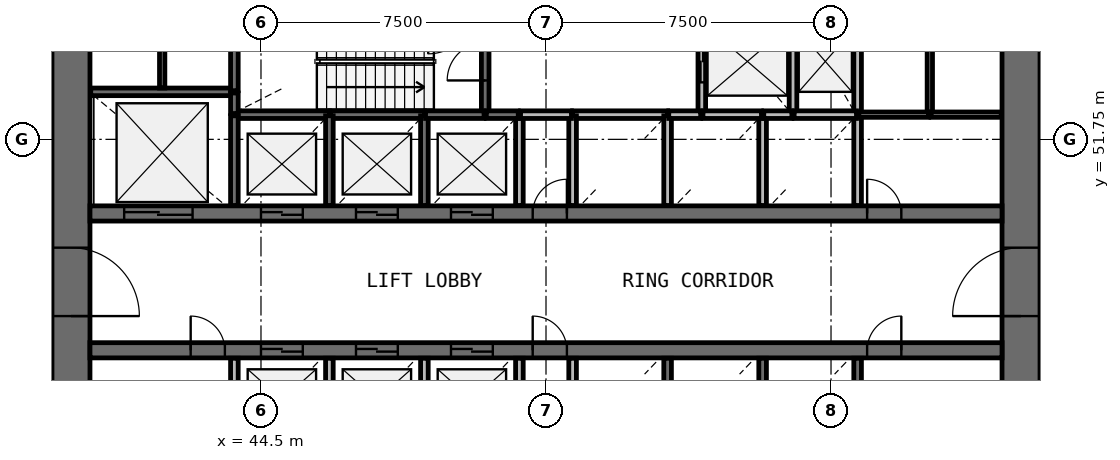
"""IFC4 building model, lengths in metres.
Left out: names, types, materials, properties, quantities, classifications, styles, units other than length and angle.
Written with IfcOpenShell. Run it as: python <this file> out.ifc"""

import sys

from ifc_helpers import new_model, si_unit, direction, frame, frame_2d, origin, place, context, subcontext, project, spatial, rectangle, extrude, source, transform, mapped, element, fill, save


model = new_model("IFC4")
c1 = context("Model", 3, precision=1e-05, world=origin(), true_north=direction((0.0, 1.0)))
c2 = subcontext(c1, "Body", "Model", "MODEL_VIEW")
j1 = project(units=[si_unit("LENGTHUNIT", "METRE"), si_unit("PLANEANGLEUNIT", "RADIAN")], contexts=[c1])
p1 = place(None, origin())
s1 = spatial("IfcSite", under=j1, at=p1, CompositionType="ELEMENT")
p2 = place(p1, origin())
s2 = spatial("IfcBuilding", under=s1, at=p2, CompositionType="ELEMENT")
p3 = place(p2, frame((0.0, 0.0, 53.4)))
s3 = spatial("IfcBuildingStorey", under=s2, at=p3, CompositionType="ELEMENT", Elevation=53.4)
p4 = place(p3, frame((64.5, 38.0, 0.0), z_axis=(0.0, 0.0, 1.0), x_axis=(0.0, 1.0, 0.0)))
e1 = element("IfcWall", 1, at=p4, inside=s3, PredefinedType="SHEAR", context=c2, shape_type="SweptSolid", body=[
    extrude(rectangle(XDim=20.0, YDim=1.0, at=frame_2d((10.0, 0.0))), origin(), (0.0, 0.0, 1.0), 4.4),
])
p5 = place(p4, frame((9.1, 0.0, 0.0)))
e2 = element("IfcOpeningElement", 2, at=p5, cuts=e1, PredefinedType="OPENING", context=c2, shape_type="SweptSolid", body=[
    extrude(rectangle(XDim=1.8, YDim=2.1, at=frame_2d((0.9, 1.05))), frame((0.0, 0.51, 0.0), z_axis=(0.0, -1.0, 0.0), x_axis=(1.0, 0.0, 0.0)), (0.0, 0.0, 1.0), 1.02),
])
p6 = place(p3, frame((39.5, 58.0, 0.0), z_axis=(0.0, 0.0, 1.0), x_axis=(0.0, -1.0, 0.0)))
e3 = element("IfcWall", 3, at=p6, inside=s3, PredefinedType="SHEAR", context=c2, shape_type="SweptSolid", body=[
    extrude(rectangle(XDim=20.0, YDim=1.0, at=frame_2d((10.0, 0.0))), origin(), (0.0, 0.0, 1.0), 4.4),
])
p7 = place(p6, frame((9.1, 0.0, 0.0)))
e4 = element("IfcOpeningElement", 4, at=p7, cuts=e3, PredefinedType="OPENING", context=c2, shape_type="SweptSolid", body=[
    extrude(rectangle(XDim=1.8, YDim=2.1, at=frame_2d((0.9, 1.05))), frame((0.0, 0.51, 0.0), z_axis=(0.0, -1.0, 0.0), x_axis=(1.0, 0.0, 0.0)), (0.0, 0.0, 1.0), 1.02),
])
p8 = place(p3, frame((40.0, 49.8, 0.0), z_axis=(0.0, 0.0, 1.0), x_axis=(1.0, 0.0, 0.0)))
e5 = element("IfcWall", 5, at=p8, inside=s3, PredefinedType="SHEAR", context=c2, shape_type="SweptSolid", body=[
    extrude(rectangle(XDim=24.0, YDim=0.4, at=frame_2d((12.0, 0.0))), origin(), (0.0, 0.0, 1.0), 4.4),
])
p9 = place(p8, frame((4.5, 0.0, 0.0)))
e6 = element("IfcOpeningElement", 6, at=p9, cuts=e5, PredefinedType="OPENING", context=c2, shape_type="SweptSolid", body=[
    extrude(rectangle(XDim=1.1, YDim=2.1, at=frame_2d((0.55, 1.05))), frame((0.0, 0.21, 0.0), z_axis=(0.0, -1.0, 0.0), x_axis=(1.0, 0.0, 0.0)), (0.0, 0.0, 1.0), 0.42),
])
p10 = place(p8, frame((7.0, 0.0, 0.0)))
e7 = element("IfcOpeningElement", 7, at=p10, cuts=e5, PredefinedType="OPENING", context=c2, shape_type="SweptSolid", body=[
    extrude(rectangle(XDim=1.1, YDim=2.1, at=frame_2d((0.55, 1.05))), frame((0.0, 0.21, 0.0), z_axis=(0.0, -1.0, 0.0), x_axis=(1.0, 0.0, 0.0)), (0.0, 0.0, 1.0), 0.42),
])
p11 = place(p8, frame((9.5, 0.0, 0.0)))
e8 = element("IfcOpeningElement", 8, at=p11, cuts=e5, PredefinedType="OPENING", context=c2, shape_type="SweptSolid", body=[
    extrude(rectangle(XDim=1.1, YDim=2.1, at=frame_2d((0.55, 1.05))), frame((0.0, 0.21, 0.0), z_axis=(0.0, -1.0, 0.0), x_axis=(1.0, 0.0, 0.0)), (0.0, 0.0, 1.0), 0.42),
])
p12 = place(p8, frame((0.9, 0.0, 0.0)))
e9 = element("IfcOpeningElement", 9, at=p12, cuts=e5, PredefinedType="OPENING", context=c2, shape_type="SweptSolid", body=[
    extrude(rectangle(XDim=1.8, YDim=2.4, at=frame_2d((0.9, 1.2))), frame((0.0, 0.21, 0.0), z_axis=(0.0, -1.0, 0.0), x_axis=(1.0, 0.0, 0.0)), (0.0, 0.0, 1.0), 0.42),
])
p13 = place(p8, frame((20.45, 0.0, 0.0)))
e10 = element("IfcOpeningElement", 10, at=p13, cuts=e5, PredefinedType="OPENING", context=c2, shape_type="SweptSolid", body=[
    extrude(rectangle(XDim=0.9, YDim=2.1, at=frame_2d((0.45, 1.05))), frame((0.0, 0.21, 0.0), z_axis=(0.0, -1.0, 0.0), x_axis=(1.0, 0.0, 0.0)), (0.0, 0.0, 1.0), 0.42),
])
p14 = place(p8, frame((11.65, 0.0, 0.0)))
e11 = element("IfcOpeningElement", 11, at=p14, cuts=e5, PredefinedType="OPENING", context=c2, shape_type="SweptSolid", body=[
    extrude(rectangle(XDim=0.9, YDim=2.1, at=frame_2d((0.45, 1.05))), frame((0.0, 0.21, 0.0), z_axis=(0.0, -1.0, 0.0), x_axis=(1.0, 0.0, 0.0)), (0.0, 0.0, 1.0), 0.42),
])
p15 = place(p3, frame((40.0, 46.2, 0.0), z_axis=(0.0, 0.0, 1.0), x_axis=(1.0, 0.0, 0.0)))
e12 = element("IfcWall", 12, at=p15, inside=s3, PredefinedType="SHEAR", context=c2, shape_type="SweptSolid", body=[
    extrude(rectangle(XDim=24.0, YDim=0.4, at=frame_2d((12.0, 0.0))), origin(), (0.0, 0.0, 1.0), 4.4),
])
p16 = place(p15, frame((4.5, 0.0, 0.0)))
e13 = element("IfcOpeningElement", 13, at=p16, cuts=e12, PredefinedType="OPENING", context=c2, shape_type="SweptSolid", body=[
    extrude(rectangle(XDim=1.1, YDim=2.1, at=frame_2d((0.55, 1.05))), frame((0.0, 0.21, 0.0), z_axis=(0.0, -1.0, 0.0), x_axis=(1.0, 0.0, 0.0)), (0.0, 0.0, 1.0), 0.42),
])
p17 = place(p15, frame((7.0, 0.0, 0.0)))
e14 = element("IfcOpeningElement", 14, at=p17, cuts=e12, PredefinedType="OPENING", context=c2, shape_type="SweptSolid", body=[
    extrude(rectangle(XDim=1.1, YDim=2.1, at=frame_2d((0.55, 1.05))), frame((0.0, 0.21, 0.0), z_axis=(0.0, -1.0, 0.0), x_axis=(1.0, 0.0, 0.0)), (0.0, 0.0, 1.0), 0.42),
])
p18 = place(p15, frame((9.5, 0.0, 0.0)))
e15 = element("IfcOpeningElement", 15, at=p18, cuts=e12, PredefinedType="OPENING", context=c2, shape_type="SweptSolid", body=[
    extrude(rectangle(XDim=1.1, YDim=2.1, at=frame_2d((0.55, 1.05))), frame((0.0, 0.21, 0.0), z_axis=(0.0, -1.0, 0.0), x_axis=(1.0, 0.0, 0.0)), (0.0, 0.0, 1.0), 0.42),
])
p19 = place(p15, frame((20.45, 0.0, 0.0)))
e16 = element("IfcOpeningElement", 16, at=p19, cuts=e12, PredefinedType="OPENING", context=c2, shape_type="SweptSolid", body=[
    extrude(rectangle(XDim=0.9, YDim=2.1, at=frame_2d((0.45, 1.05))), frame((0.0, 0.21, 0.0), z_axis=(0.0, -1.0, 0.0), x_axis=(1.0, 0.0, 0.0)), (0.0, 0.0, 1.0), 0.42),
])
p20 = place(p15, frame((2.65, 0.0, 0.0)))
e17 = element("IfcOpeningElement", 17, at=p20, cuts=e12, PredefinedType="OPENING", context=c2, shape_type="SweptSolid", body=[
    extrude(rectangle(XDim=0.9, YDim=2.1, at=frame_2d((0.45, 1.05))), frame((0.0, 0.21, 0.0), z_axis=(0.0, -1.0, 0.0), x_axis=(1.0, 0.0, 0.0)), (0.0, 0.0, 1.0), 0.42),
])
p21 = place(p15, frame((11.65, 0.0, 0.0)))
e18 = element("IfcOpeningElement", 18, at=p21, cuts=e12, PredefinedType="OPENING", context=c2, shape_type="SweptSolid", body=[
    extrude(rectangle(XDim=0.9, YDim=2.1, at=frame_2d((0.45, 1.05))), frame((0.0, 0.21, 0.0), z_axis=(0.0, -1.0, 0.0), x_axis=(1.0, 0.0, 0.0)), (0.0, 0.0, 1.0), 0.42),
])
p22 = place(p3, frame((43.8, 53.0, 0.0), z_axis=(0.0, 0.0, 1.0), x_axis=(-1.0, 0.0, 0.0)))
e19 = element("IfcWall", 19, at=p22, inside=s3, PredefinedType="SOLIDWALL", context=c2, shape_type="SweptSolid", body=[
    extrude(rectangle(XDim=3.78, YDim=0.2, at=frame_2d((1.89, 0.0))), origin(), (0.0, 0.0, 1.0), 3.95),
])
p23 = place(p3, frame((50.4, 52.4, 0.0), z_axis=(0.0, 0.0, 1.0), x_axis=(0.0, 1.0, 0.0)))
e20 = element("IfcWall", 20, at=p23, inside=s3, PredefinedType="SOLIDWALL", context=c2, shape_type="SweptSolid", body=[
    extrude(rectangle(XDim=2.77, YDim=0.2, at=frame_2d((1.385, 0.0))), origin(), (0.0, 0.0, 1.0), 3.95),
])
p24 = place(p23, frame((0.9, 0.0, 0.0)))
e21 = element("IfcOpeningElement", 21, at=p24, cuts=e20, PredefinedType="OPENING", context=c2, shape_type="SweptSolid", body=[
    extrude(rectangle(XDim=1.0, YDim=2.1, at=frame_2d((0.5, 1.05))), frame((0.0, 0.11, 0.0), z_axis=(0.0, -1.0, 0.0), x_axis=(1.0, 0.0, 0.0)), (0.0, 0.0, 1.0), 0.22),
])
p25 = place(p3, frame((56.1, 55.17, 0.0), z_axis=(0.0, 0.0, 1.0), x_axis=(0.0, -1.0, 0.0)))
e22 = element("IfcWall", 22, at=p25, inside=s3, PredefinedType="SOLIDWALL", context=c2, shape_type="SweptSolid", body=[
    extrude(rectangle(XDim=2.77, YDim=0.2, at=frame_2d((1.385, 0.0))), origin(), (0.0, 0.0, 1.0), 3.95),
])
p26 = place(p25, frame((0.82, 0.0, 0.0)))
e23 = element("IfcOpeningElement", 23, at=p26, cuts=e22, PredefinedType="OPENING", context=c2, shape_type="SweptSolid", body=[
    extrude(rectangle(XDim=1.1, YDim=2.1, at=frame_2d((0.55, 1.05))), frame((0.0, 0.11, 0.0), z_axis=(0.0, -1.0, 0.0), x_axis=(1.0, 0.0, 0.0)), (0.0, 0.0, 1.0), 0.22),
])
for number, where, z_axis, x_axis in (
    (24, (58.5, 52.4, 0.0), (0.0, 0.0, 1.0), (0.0, 1.0, 0.0)),
    (25, (60.2, 52.4, 0.0), (0.0, 0.0, 1.0), (0.0, 1.0, 0.0)),
):
    element("IfcWall", number, at=place(p3, frame(where, z_axis=z_axis, x_axis=x_axis)), inside=s3, PredefinedType="SOLIDWALL", context=c2, shape_type="SweptSolid", body=[
        extrude(rectangle(XDim=2.8, YDim=0.2, at=frame_2d((1.4, 0.0))), origin(), (0.0, 0.0, 1.0), 3.95),
    ])
p27 = place(p3, frame((46.3, 52.4, 0.0), z_axis=(0.0, 0.0, 1.0), x_axis=(-1.0, 0.0, 0.0)))
e26 = element("IfcWall", 26, at=p27, inside=s3, PredefinedType="SOLIDWALL", context=c2, shape_type="SweptSolid", body=[
    extrude(rectangle(XDim=2.5, YDim=0.2, at=frame_2d((1.25, 0.0))), origin(), (0.0, 0.0, 1.0), 3.95),
])
p28 = place(p3, frame((48.8, 52.4, 0.0), z_axis=(0.0, 0.0, 1.0), x_axis=(-1.0, 0.0, 0.0)))
e27 = element("IfcWall", 27, at=p28, inside=s3, PredefinedType="SOLIDWALL", context=c2, shape_type="SweptSolid", body=[
    extrude(rectangle(XDim=2.47, YDim=0.2, at=frame_2d((1.235, 0.0))), origin(), (0.0, 0.0, 1.0), 3.95),
])
p29 = place(p3, frame((55.2, 52.4, 0.0), z_axis=(0.0, 0.0, 1.0), x_axis=(-1.0, 0.0, 0.0)))
e28 = element("IfcWall", 28, at=p29, inside=s3, PredefinedType="SOLIDWALL", context=c2, shape_type="SweptSolid", body=[
    extrude(rectangle(XDim=2.5, YDim=0.2, at=frame_2d((1.25, 0.0))), origin(), (0.0, 0.0, 1.0), 3.95),
])
for number, where, z_axis, x_axis in (
    (29, (43.8, 45.99, 0.0), (0.0, 0.0, 1.0), (0.0, -1.0, 0.0)),
    (30, (43.8, 52.37, 0.0), (0.0, 0.0, 1.0), (0.0, -1.0, 0.0)),
):
    element("IfcWall", number, at=place(p3, frame(where, z_axis=z_axis, x_axis=x_axis)), inside=s3, PredefinedType="SOLIDWALL", context=c2, shape_type="SweptSolid", body=[
        extrude(rectangle(XDim=2.36, YDim=0.2, at=frame_2d((1.18, 0.0))), origin(), (0.0, 0.0, 1.0), 3.95),
    ])
p30 = place(p3, frame((46.3, 43.6, 0.0), z_axis=(0.0, 0.0, 1.0), x_axis=(0.0, 1.0, 0.0)))
e31 = element("IfcWall", 31, at=p30, inside=s3, PredefinedType="SOLIDWALL", context=c2, shape_type="SweptSolid", body=[
    extrude(rectangle(XDim=2.39, YDim=0.2, at=frame_2d((1.195, 0.0))), origin(), (0.0, 0.0, 1.0), 3.95),
])
for number, where, z_axis, x_axis in (
    (32, (46.3, 50.01, 0.0), (0.0, 0.0, 1.0), (0.0, 1.0, 0.0)),
    (33, (48.8, 43.63, 0.0), (0.0, 0.0, 1.0), (0.0, 1.0, 0.0)),
    (34, (48.8, 50.01, 0.0), (0.0, 0.0, 1.0), (0.0, 1.0, 0.0)),
    (35, (51.3, 43.63, 0.0), (0.0, 0.0, 1.0), (0.0, 1.0, 0.0)),
):
    element("IfcWall", number, at=place(p3, frame(where, z_axis=z_axis, x_axis=x_axis)), inside=s3, PredefinedType="SOLIDWALL", context=c2, shape_type="SweptSolid", body=[
        extrude(rectangle(XDim=2.36, YDim=0.2, at=frame_2d((1.18, 0.0))), origin(), (0.0, 0.0, 1.0), 3.95),
    ])
for number, where, z_axis, x_axis in (
    (36, (51.3, 50.01, 0.0), (0.0, 0.0, 1.0), (0.0, 1.0, 0.0)),
    (37, (52.7, 45.99, 0.0), (0.0, 0.0, 1.0), (0.0, -1.0, 0.0)),
):
    element("IfcWall", number, at=place(p3, frame(where, z_axis=z_axis, x_axis=x_axis)), inside=s3, PredefinedType="SOLIDWALL", context=c2, shape_type="SweptSolid", body=[
        extrude(rectangle(XDim=2.39, YDim=0.2, at=frame_2d((1.195, 0.0))), origin(), (0.0, 0.0, 1.0), 3.95),
    ])
for number, where, z_axis, x_axis in (
    (38, (52.7, 52.37, 0.0), (0.0, 0.0, 1.0), (0.0, -1.0, 0.0)),
    (39, (55.2, 43.63, 0.0), (0.0, 0.0, 1.0), (0.0, 1.0, 0.0)),
    (40, (55.2, 50.01, 0.0), (0.0, 0.0, 1.0), (0.0, 1.0, 0.0)),
    (41, (57.7, 43.63, 0.0), (0.0, 0.0, 1.0), (0.0, 1.0, 0.0)),
):
    element("IfcWall", number, at=place(p3, frame(where, z_axis=z_axis, x_axis=x_axis)), inside=s3, PredefinedType="SOLIDWALL", context=c2, shape_type="SweptSolid", body=[
        extrude(rectangle(XDim=2.36, YDim=0.2, at=frame_2d((1.18, 0.0))), origin(), (0.0, 0.0, 1.0), 3.95),
    ])
p31 = place(p3, frame((57.7, 50.01, 0.0), z_axis=(0.0, 0.0, 1.0), x_axis=(0.0, 1.0, 0.0)))
e42 = element("IfcWall", 42, at=p31, inside=s3, PredefinedType="SOLIDWALL", context=c2, shape_type="SweptSolid", body=[
    extrude(rectangle(XDim=2.39, YDim=0.2, at=frame_2d((1.195, 0.0))), origin(), (0.0, 0.0, 1.0), 3.95),
])
for number, where, z_axis, x_axis in (
    (43, (60.2, 43.63, 0.0), (0.0, 0.0, 1.0), (0.0, 1.0, 0.0)),
    (44, (60.2, 50.01, 0.0), (0.0, 0.0, 1.0), (0.0, 1.0, 0.0)),
):
    element("IfcWall", number, at=place(p3, frame(where, z_axis=z_axis, x_axis=x_axis)), inside=s3, PredefinedType="SOLIDWALL", context=c2, shape_type="SweptSolid", body=[
        extrude(rectangle(XDim=2.36, YDim=0.2, at=frame_2d((1.18, 0.0))), origin(), (0.0, 0.0, 1.0), 3.95),
    ])
p32 = place(p3, frame((43.8, 55.17, 0.0), z_axis=(0.0, 0.0, 1.0), x_axis=(0.0, -1.0, 0.0)))
e45 = element("IfcWall", 45, at=p32, inside=s3, PredefinedType="SOLIDWALL", context=c2, shape_type="SweptSolid", body=[
    extrude(rectangle(XDim=2.14, YDim=0.2, at=frame_2d((1.07, 0.0))), origin(), (0.0, 0.0, 1.0), 3.95),
])
p33 = place(p3, frame((60.17, 52.4, 0.0), z_axis=(0.0, 0.0, 1.0), x_axis=(-1.0, 0.0, 0.0)))
e46 = element("IfcWall", 46, at=p33, inside=s3, PredefinedType="SOLIDWALL", context=c2, shape_type="SweptSolid", body=[
    extrude(rectangle(XDim=1.64, YDim=0.2, at=frame_2d((0.82, 0.0))), origin(), (0.0, 0.0, 1.0), 3.95),
])
for number, where, z_axis, x_axis in (
    (47, (50.37, 52.4, 0.0), (0.0, 0.0, 1.0), (-1.0, 0.0, 0.0)),
    (48, (57.67, 52.4, 0.0), (0.0, 0.0, 1.0), (-1.0, 0.0, 0.0)),
):
    element("IfcWall", number, at=place(p3, frame(where, z_axis=z_axis, x_axis=x_axis)), inside=s3, PredefinedType="SOLIDWALL", context=c2, shape_type="SweptSolid", body=[
        extrude(rectangle(XDim=1.54, YDim=0.2, at=frame_2d((0.77, 0.0))), origin(), (0.0, 0.0, 1.0), 3.95),
    ])
p34 = place(p3, frame((51.33, 52.4, 0.0), z_axis=(0.0, 0.0, 1.0), x_axis=(1.0, 0.0, 0.0)))
e49 = element("IfcWall", 49, at=p34, inside=s3, PredefinedType="SOLIDWALL", context=c2, shape_type="SweptSolid", body=[
    extrude(rectangle(XDim=1.34, YDim=0.2, at=frame_2d((0.67, 0.0))), origin(), (0.0, 0.0, 1.0), 3.95),
])
for number, where, z_axis, x_axis in (
    (50, (51.27, 52.4, 0.0), (0.0, 0.0, 1.0), (-1.0, 0.0, 0.0)),
    (51, (56.07, 52.4, 0.0), (0.0, 0.0, 1.0), (-1.0, 0.0, 0.0)),
):
    element("IfcWall", number, at=place(p3, frame(where, z_axis=z_axis, x_axis=x_axis)), inside=s3, PredefinedType="SOLIDWALL", context=c2, shape_type="SweptSolid", body=[
        extrude(rectangle(XDim=0.84, YDim=0.2, at=frame_2d((0.42, 0.0))), origin(), (0.0, 0.0, 1.0), 3.95),
    ])
p35 = place(p3, frame((58.47, 52.4, 0.0), z_axis=(0.0, 0.0, 1.0), x_axis=(-1.0, 0.0, 0.0)))
e52 = element("IfcWall", 52, at=p35, inside=s3, PredefinedType="SOLIDWALL", context=c2, shape_type="SweptSolid", body=[
    extrude(rectangle(XDim=0.74, YDim=0.2, at=frame_2d((0.37, 0.0))), origin(), (0.0, 0.0, 1.0), 3.95),
])
p36 = place(p3, frame((43.8, 52.43, 0.0), z_axis=(0.0, 0.0, 1.0), x_axis=(0.0, 1.0, 0.0)))
e53 = element("IfcWall", 53, at=p36, inside=s3, PredefinedType="SOLIDWALL", context=c2, shape_type="SweptSolid", body=[
    extrude(rectangle(XDim=0.54, YDim=0.2, at=frame_2d((0.27, 0.0))), origin(), (0.0, 0.0, 1.0), 3.95),
])
p37 = place(p3, frame((62.1, 52.4, 0.0), z_axis=(0.0, 0.0, 1.0), x_axis=(0.0, 1.0, 0.0)))
e54 = element("IfcWall", 54, at=p37, inside=s3, PredefinedType="PARTITIONING", context=c2, shape_type="SweptSolid", body=[
    extrude(rectangle(XDim=2.71, YDim=0.14, at=frame_2d((1.355, 0.0))), origin(), (0.0, 0.0, 1.0), 3.05),
])
p38 = place(p3, frame((41.9, 53.1, 0.0), z_axis=(0.0, 0.0, 1.0), x_axis=(0.0, 1.0, 0.0)))
e55 = element("IfcWall", 55, at=p38, inside=s3, PredefinedType="PARTITIONING", context=c2, shape_type="SweptSolid", body=[
    extrude(rectangle(XDim=2.01, YDim=0.14, at=frame_2d((1.005, 0.0))), origin(), (0.0, 0.0, 1.0), 3.05),
])
p39 = place(p3, frame((62.07, 52.4, 0.0), z_axis=(0.0, 0.0, 1.0), x_axis=(-1.0, 0.0, 0.0)))
e56 = element("IfcWall", 56, at=p39, inside=s3, PredefinedType="PARTITIONING", context=c2, shape_type="SweptSolid", body=[
    extrude(rectangle(XDim=1.84, YDim=0.14, at=frame_2d((0.92, 0.0))), origin(), (0.0, 0.0, 1.0), 3.05),
])
p40 = place(p3, frame((63.98, 52.4, 0.0), z_axis=(0.0, 0.0, 1.0), x_axis=(-1.0, 0.0, 0.0)))
e57 = element("IfcWall", 57, at=p40, inside=s3, PredefinedType="PARTITIONING", context=c2, shape_type="SweptSolid", body=[
    extrude(rectangle(XDim=1.85, YDim=0.14, at=frame_2d((0.925, 0.0))), origin(), (0.0, 0.0, 1.0), 3.05),
])
m1 = source(origin(), c2, "Body", "SweptSolid", [
    extrude(rectangle(XDim=1.8, YDim=2.1, at=frame_2d((0.9, 1.05))), frame((0.0, 0.025, 0.0), z_axis=(0.0, -1.0, 0.0), x_axis=(1.0, 0.0, 0.0)), (0.0, 0.0, 1.0), 0.05),
])
p41 = place(p7, origin())
e58 = element("IfcDoor", 58, at=p41, inside=s3, OperationType="SINGLE_SWING_RIGHT", PredefinedType="DOOR", context=c2, shape_type="MappedRepresentation", body=[
    mapped(m1, transform((0.0, 0.0, 0.0), scale=1.0)),
])
fill(e4, e58)
p42 = place(p5, origin())
e59 = element("IfcDoor", 59, at=p42, inside=s3, OperationType="SINGLE_SWING_LEFT", PredefinedType="DOOR", context=c2, shape_type="MappedRepresentation", body=[
    mapped(m1, transform((0.0, 0.0, 0.0), scale=1.0)),
])
fill(e2, e59)
m2 = source(origin(), c2, "Body", "SweptSolid", [
    extrude(rectangle(XDim=1.1, YDim=2.1, at=frame_2d((0.55, 1.05))), frame((0.0, 0.025, 0.0), z_axis=(0.0, -1.0, 0.0), x_axis=(1.0, 0.0, 0.0)), (0.0, 0.0, 1.0), 0.05),
])
p43 = place(p9, origin())
e60 = element("IfcDoor", 60, at=p43, inside=s3, OperationType="DOUBLE_DOOR_SLIDING", PredefinedType="USERDEFINED", context=c2, shape_type="MappedRepresentation", body=[
    mapped(m2, transform((0.0, 0.0, 0.0), scale=1.0)),
])
fill(e6, e60)
p44 = place(p10, origin())
e61 = element("IfcDoor", 61, at=p44, inside=s3, OperationType="DOUBLE_DOOR_SLIDING", PredefinedType="USERDEFINED", context=c2, shape_type="MappedRepresentation", body=[
    mapped(m2, transform((0.0, 0.0, 0.0), scale=1.0)),
])
fill(e7, e61)
p45 = place(p11, origin())
e62 = element("IfcDoor", 62, at=p45, inside=s3, OperationType="DOUBLE_DOOR_SLIDING", PredefinedType="USERDEFINED", context=c2, shape_type="MappedRepresentation", body=[
    mapped(m2, transform((0.0, 0.0, 0.0), scale=1.0)),
])
fill(e8, e62)
p46 = place(p16, origin())
e63 = element("IfcDoor", 63, at=p46, inside=s3, OperationType="DOUBLE_DOOR_SLIDING", PredefinedType="USERDEFINED", context=c2, shape_type="MappedRepresentation", body=[
    mapped(m2, transform((0.0, 0.0, 0.0), scale=1.0)),
])
fill(e13, e63)
p47 = place(p17, origin())
e64 = element("IfcDoor", 64, at=p47, inside=s3, OperationType="DOUBLE_DOOR_SLIDING", PredefinedType="USERDEFINED", context=c2, shape_type="MappedRepresentation", body=[
    mapped(m2, transform((0.0, 0.0, 0.0), scale=1.0)),
])
fill(e14, e64)
p48 = place(p18, origin())
e65 = element("IfcDoor", 65, at=p48, inside=s3, OperationType="DOUBLE_DOOR_SLIDING", PredefinedType="USERDEFINED", context=c2, shape_type="MappedRepresentation", body=[
    mapped(m2, transform((0.0, 0.0, 0.0), scale=1.0)),
])
fill(e15, e65)
p49 = place(p26, origin())
e66 = element("IfcDoor", 66, at=p49, inside=s3, OperationType="DOUBLE_DOOR_SLIDING", PredefinedType="USERDEFINED", context=c2, shape_type="MappedRepresentation", body=[
    mapped(m2, transform((0.0, 0.0, 0.0), scale=1.0)),
])
fill(e23, e66)
m3 = source(origin(), c2, "Body", "SweptSolid", [
    extrude(rectangle(XDim=1.8, YDim=2.4, at=frame_2d((0.9, 1.2))), frame((0.0, 0.025, 0.0), z_axis=(0.0, -1.0, 0.0), x_axis=(1.0, 0.0, 0.0)), (0.0, 0.0, 1.0), 0.05),
])
p50 = place(p12, origin())
e67 = element("IfcDoor", 67, at=p50, inside=s3, OperationType="DOUBLE_DOOR_SLIDING", PredefinedType="USERDEFINED", context=c2, shape_type="MappedRepresentation", body=[
    mapped(m3, transform((0.0, 0.0, 0.0), scale=1.0)),
])
fill(e9, e67)
m4 = source(origin(), c2, "Body", "SweptSolid", [
    extrude(rectangle(XDim=1.0, YDim=2.1, at=frame_2d((0.5, 1.05))), frame((0.0, 0.025, 0.0), z_axis=(0.0, -1.0, 0.0), x_axis=(1.0, 0.0, 0.0)), (0.0, 0.0, 1.0), 0.05),
])
p51 = place(p24, origin())
e68 = element("IfcDoor", 68, at=p51, inside=s3, OperationType="SINGLE_SWING_LEFT", PredefinedType="DOOR", context=c2, shape_type="MappedRepresentation", body=[
    mapped(m4, transform((0.0, 0.0, 0.0), scale=1.0)),
])
fill(e21, e68)
m5 = source(origin(), c2, "Body", "SweptSolid", [
    extrude(rectangle(XDim=0.9, YDim=2.1, at=frame_2d((0.45, 1.05))), frame((0.0, 0.025, 0.0), z_axis=(0.0, -1.0, 0.0), x_axis=(1.0, 0.0, 0.0)), (0.0, 0.0, 1.0), 0.05),
])
p52 = place(p19, origin())
e69 = element("IfcDoor", 69, at=p52, inside=s3, OperationType="SINGLE_SWING_RIGHT", PredefinedType="DOOR", context=c2, shape_type="MappedRepresentation", body=[
    mapped(m5, transform((0.0, 0.0, 0.0), scale=1.0)),
])
fill(e16, e69)
p53 = place(p13, origin())
e70 = element("IfcDoor", 70, at=p53, inside=s3, OperationType="SINGLE_SWING_LEFT", PredefinedType="DOOR", context=c2, shape_type="MappedRepresentation", body=[
    mapped(m5, transform((0.0, 0.0, 0.0), scale=1.0)),
])
fill(e10, e70)
p54 = place(p20, origin())
e71 = element("IfcDoor", 71, at=p54, inside=s3, OperationType="SINGLE_SWING_LEFT", PredefinedType="DOOR", context=c2, shape_type="MappedRepresentation", body=[
    mapped(m5, transform((0.0, 0.0, 0.0), scale=1.0)),
])
fill(e17, e71)
p55 = place(p14, origin())
e72 = element("IfcDoor", 72, at=p55, inside=s3, OperationType="SINGLE_SWING_RIGHT", PredefinedType="DOOR", context=c2, shape_type="MappedRepresentation", body=[
    mapped(m5, transform((0.0, 0.0, 0.0), scale=1.0)),
])
fill(e11, e72)
p56 = place(p21, origin())
e73 = element("IfcDoor", 73, at=p56, inside=s3, OperationType="SINGLE_SWING_LEFT", PredefinedType="DOOR", context=c2, shape_type="MappedRepresentation", body=[
    mapped(m5, transform((0.0, 0.0, 0.0), scale=1.0)),
])
fill(e18, e73)
save(model, sys.argv[1])
